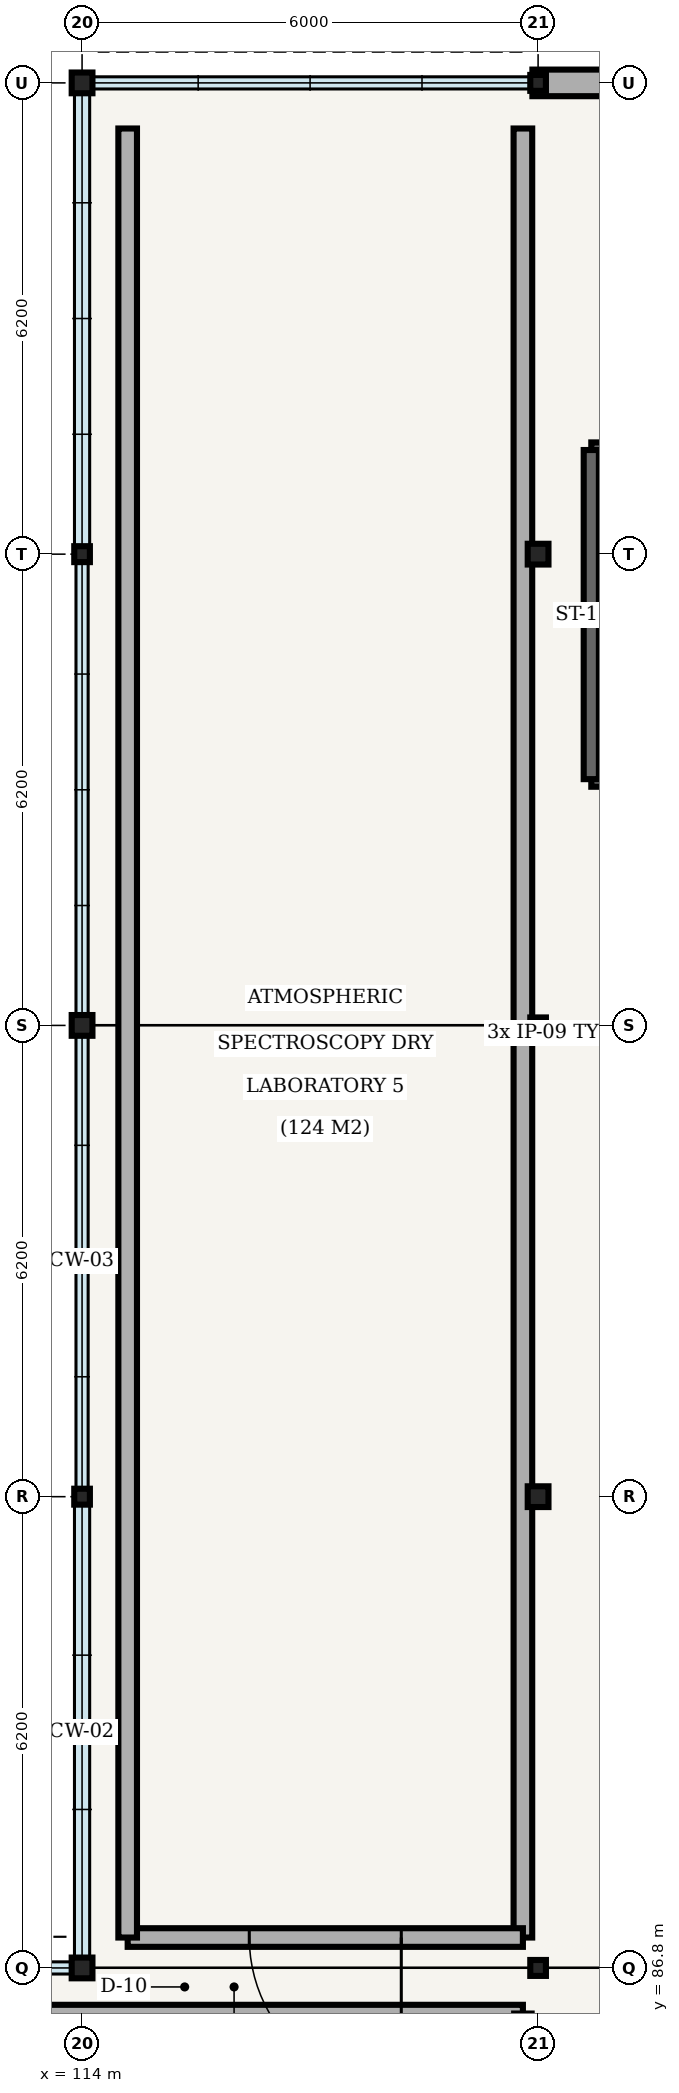
"""IFC4 building model, lengths in metres.
Left out: names, types, materials, properties, quantities, classifications, styles, units other than length and angle.
Written with IfcOpenShell. Run it as: python <this file> out.ifc"""

import sys

from ifc_helpers import new_model, si_unit, direction, frame, frame_2d, origin, origin_2d, place, context, subcontext, project, spatial, rectangle, hollow_circle, i_section, extrude, element, fill, save


model = new_model("IFC4")
c1 = context("Model", 3, precision=1e-05, world=origin(), true_north=direction((0.0, 1.0)))
c2 = subcontext(c1, "Body", "Model", "MODEL_VIEW")
j1 = project(units=[si_unit("LENGTHUNIT", "METRE"), si_unit("PLANEANGLEUNIT", "RADIAN")], contexts=[c1])
p1 = place(None, origin())
s1 = spatial("IfcSite", under=j1, at=p1, CompositionType="ELEMENT")
p2 = place(p1, origin())
s2 = spatial("IfcBuilding", under=s1, at=p2, CompositionType="ELEMENT")
p3 = place(p2, frame((0.0, 0.0, 20.4)))
s3 = spatial("IfcBuildingStorey", under=s2, at=p3, CompositionType="ELEMENT", Elevation=20.4)
p4 = place(p3, frame((114.0, 86.8, 0.0), z_axis=(0.0, 0.0, 1.0), x_axis=(1.0, 0.0, 0.0)))
e1 = element("IfcColumn", 1, at=p4, inside=s3, PredefinedType="COLUMN", context=c2, shape_type="SweptSolid", body=[
    extrude(hollow_circle(Radius=0.136, WallThickness=0.01, at=origin_2d()), origin(), (0.0, 0.0, 1.0), 4.8),
])
p5 = place(p3, frame((114.0, 93.0, 0.0), z_axis=(0.0, 0.0, 1.0), x_axis=(1.0, 0.0, 0.0)))
e2 = element("IfcColumn", 2, at=p5, inside=s3, PredefinedType="COLUMN", context=c2, shape_type="SweptSolid", body=[
    extrude(i_section(OverallWidth=0.206, OverallDepth=0.21, WebThickness=0.01, FlangeThickness=0.014, FilletRadius=0.01, at=origin_2d()), origin(), (0.0, 0.0, 1.0), 4.8),
])
p6 = place(p3, frame((114.0, 99.2, 0.0), z_axis=(0.0, 0.0, 1.0), x_axis=(1.0, 0.0, 0.0)))
e3 = element("IfcColumn", 3, at=p6, inside=s3, PredefinedType="COLUMN", context=c2, shape_type="SweptSolid", body=[
    extrude(hollow_circle(Radius=0.136, WallThickness=0.01, at=origin_2d()), origin(), (0.0, 0.0, 1.0), 4.8),
])
p7 = place(p3, frame((114.0, 105.4, 0.0), z_axis=(0.0, 0.0, 1.0), x_axis=(1.0, 0.0, 0.0)))
e4 = element("IfcColumn", 4, at=p7, inside=s3, PredefinedType="COLUMN", context=c2, shape_type="SweptSolid", body=[
    extrude(i_section(OverallWidth=0.206, OverallDepth=0.21, WebThickness=0.01, FlangeThickness=0.014, FilletRadius=0.01, at=origin_2d()), origin(), (0.0, 0.0, 1.0), 4.8),
])
p8 = place(p3, frame((114.0, 111.6, 0.0), z_axis=(0.0, 0.0, 1.0), x_axis=(1.0, 0.0, 0.0)))
e5 = element("IfcColumn", 5, at=p8, inside=s3, PredefinedType="COLUMN", context=c2, shape_type="SweptSolid", body=[
    extrude(hollow_circle(Radius=0.136, WallThickness=0.01, at=origin_2d()), origin(), (0.0, 0.0, 1.0), 4.8),
])
p9 = place(p3, frame((120.0, 86.8, 0.0), z_axis=(0.0, 0.0, 1.0), x_axis=(1.0, 0.0, 0.0)))
e6 = element("IfcColumn", 6, at=p9, inside=s3, PredefinedType="COLUMN", context=c2, shape_type="SweptSolid", body=[
    extrude(i_section(OverallWidth=0.206, OverallDepth=0.21, WebThickness=0.01, FlangeThickness=0.014, FilletRadius=0.01, at=origin_2d()), origin(), (0.0, 0.0, 1.0), 4.8),
])
p10 = place(p3, frame((120.0, 93.0, 0.0), z_axis=(0.0, 0.0, 1.0), x_axis=(1.0, 0.0, 0.0)))
e7 = element("IfcColumn", 7, at=p10, inside=s3, PredefinedType="COLUMN", context=c2, shape_type="SweptSolid", body=[
    extrude(hollow_circle(Radius=0.136, WallThickness=0.01, at=origin_2d()), origin(), (0.0, 0.0, 1.0), 4.8),
])
p11 = place(p3, frame((120.0, 99.2, 0.0), z_axis=(0.0, 0.0, 1.0), x_axis=(1.0, 0.0, 0.0)))
e8 = element("IfcColumn", 8, at=p11, inside=s3, PredefinedType="COLUMN", context=c2, shape_type="SweptSolid", body=[
    extrude(i_section(OverallWidth=0.206, OverallDepth=0.21, WebThickness=0.01, FlangeThickness=0.014, FilletRadius=0.01, at=origin_2d()), origin(), (0.0, 0.0, 1.0), 4.8),
])
p12 = place(p3, frame((120.0, 105.4, 0.0), z_axis=(0.0, 0.0, 1.0), x_axis=(1.0, 0.0, 0.0)))
e9 = element("IfcColumn", 9, at=p12, inside=s3, PredefinedType="COLUMN", context=c2, shape_type="SweptSolid", body=[
    extrude(hollow_circle(Radius=0.136, WallThickness=0.01, at=origin_2d()), origin(), (0.0, 0.0, 1.0), 4.8),
])
p13 = place(p3, frame((120.0, 111.6, 0.0), z_axis=(0.0, 0.0, 1.0), x_axis=(1.0, 0.0, 0.0)))
e10 = element("IfcColumn", 10, at=p13, inside=s3, PredefinedType="COLUMN", context=c2, shape_type="SweptSolid", body=[
    extrude(i_section(OverallWidth=0.206, OverallDepth=0.21, WebThickness=0.01, FlangeThickness=0.014, FilletRadius=0.01, at=origin_2d()), origin(), (0.0, 0.0, 1.0), 4.8),
])
p14 = place(p3, frame((126.075, 111.6, 0.0), z_axis=(0.0, 0.0, 1.0), x_axis=(-1.0, 0.0, 0.0)))
e11 = element("IfcWall", 11, at=p14, inside=s3, PredefinedType="SOLIDWALL", context=c2, shape_type="SweptSolid", body=[
    extrude(rectangle(XDim=6.15, YDim=0.35, at=frame_2d((3.075, 0.0))), origin(), (0.0, 0.0, 1.0), 3.76),
])
p15 = place(p3, frame((120.7, 102.44, 0.0), z_axis=(0.0, 0.0, 1.0), x_axis=(1.0, 0.0, 0.0)))
e12 = element("IfcWall", 12, at=p15, inside=s3, PredefinedType="SHEAR", context=c2, shape_type="SweptSolid", body=[
    extrude(rectangle(XDim=3.34, YDim=0.2, at=frame_2d((1.67, 0.0))), origin(), (0.0, 0.0, 1.0), 4.55),
])
p16 = place(p15, frame((0.895, 0.0, 0.0)))
e13 = element("IfcOpeningElement", 13, at=p16, cuts=e12, PredefinedType="OPENING", context=c2, shape_type="SweptSolid", body=[
    extrude(rectangle(XDim=1.55, YDim=2.2, at=frame_2d((0.775, 1.1))), frame((0.0, 0.11, 0.0), z_axis=(0.0, -1.0, 0.0), x_axis=(1.0, 0.0, 0.0)), (0.0, 0.0, 1.0), 0.22),
])
p17 = place(p3, frame((124.04, 106.77, 0.0), z_axis=(0.0, 0.0, 1.0), x_axis=(-1.0, 0.0, 0.0)))
e14 = element("IfcWall", 14, at=p17, inside=s3, PredefinedType="SHEAR", context=c2, shape_type="SweptSolid", body=[
    extrude(rectangle(XDim=3.34, YDim=0.2, at=frame_2d((1.67, 0.0))), origin(), (0.0, 0.0, 1.0), 4.55),
])
p18 = place(p3, frame((120.7, 106.77, 0.0), z_axis=(0.0, 0.0, 1.0), x_axis=(0.0, -1.0, 0.0)))
e15 = element("IfcWall", 15, at=p18, inside=s3, PredefinedType="SHEAR", context=c2, shape_type="SweptSolid", body=[
    extrude(rectangle(XDim=4.33, YDim=0.2, at=frame_2d((2.165, 0.0))), origin(), (0.0, 0.0, 1.0), 4.55),
])
p19 = place(p3, frame((112.2, 86.2, 0.0), z_axis=(0.0, 0.0, 1.0), x_axis=(1.0, 0.0, 0.0)))
e16 = element("IfcWall", 16, at=p19, inside=s3, PredefinedType="PARTITIONING", context=c2, shape_type="SweptSolid", body=[
    extrude(rectangle(XDim=7.6, YDim=0.23, at=frame_2d((3.8, 0.0))), origin(), (0.0, 0.0, 1.0), 3.65),
])
p20 = place(p3, frame((119.8, 111.0, 0.0), z_axis=(0.0, 0.0, 1.0), x_axis=(0.0, -1.0, 0.0)))
e17 = element("IfcWall", 17, at=p20, inside=s3, PredefinedType="PARTITIONING", context=c2, shape_type="SweptSolid", body=[
    extrude(rectangle(XDim=23.8, YDim=0.245, at=frame_2d((11.9, 0.0))), origin(), (0.0, 0.0, 1.0), 3.65),
])
p21 = place(p3, frame((119.8, 87.2, 0.0), z_axis=(0.0, 0.0, 1.0), x_axis=(-1.0, 0.0, 0.0)))
e18 = element("IfcWall", 18, at=p21, inside=s3, PredefinedType="PARTITIONING", context=c2, shape_type="SweptSolid", body=[
    extrude(rectangle(XDim=5.2, YDim=0.245, at=frame_2d((2.6, 0.0))), origin(), (0.0, 0.0, 1.0), 3.65),
])
p22 = place(p21, frame((1.6, 0.0, 0.0)))
e19 = element("IfcOpeningElement", 19, at=p22, cuts=e18, PredefinedType="OPENING", context=c2, shape_type="SweptSolid", body=[
    extrude(rectangle(XDim=2.0, YDim=2.1, at=frame_2d((1.0, 1.05))), frame((0.0, 0.133, 0.0), z_axis=(0.0, -1.0, 0.0), x_axis=(1.0, 0.0, 0.0)), (0.0, 0.0, 1.0), 0.265),
])
p23 = place(p3, frame((114.6, 87.2, 0.0), z_axis=(0.0, 0.0, 1.0), x_axis=(0.0, 1.0, 0.0)))
e20 = element("IfcWall", 20, at=p23, inside=s3, PredefinedType="PARTITIONING", context=c2, shape_type="SweptSolid", body=[
    extrude(rectangle(XDim=23.8, YDim=0.245, at=frame_2d((11.9, 0.0))), origin(), (0.0, 0.0, 1.0), 3.65),
])
p24 = place(p22, origin())
e21 = element("IfcDoor", 21, at=p24, inside=s3, OperationType="DOUBLE_DOOR_SINGLE_SWING", PredefinedType="DOOR", context=c2, shape_type="SweptSolid", body=[
    extrude(rectangle(XDim=2.0, YDim=2.1, at=frame_2d((1.0, 1.05))), frame((0.0, 0.025, 0.0), z_axis=(0.0, -1.0, 0.0), x_axis=(1.0, 0.0, 0.0)), (0.0, 0.0, 1.0), 0.05),
])
fill(e19, e21)
save(model, sys.argv[1])
